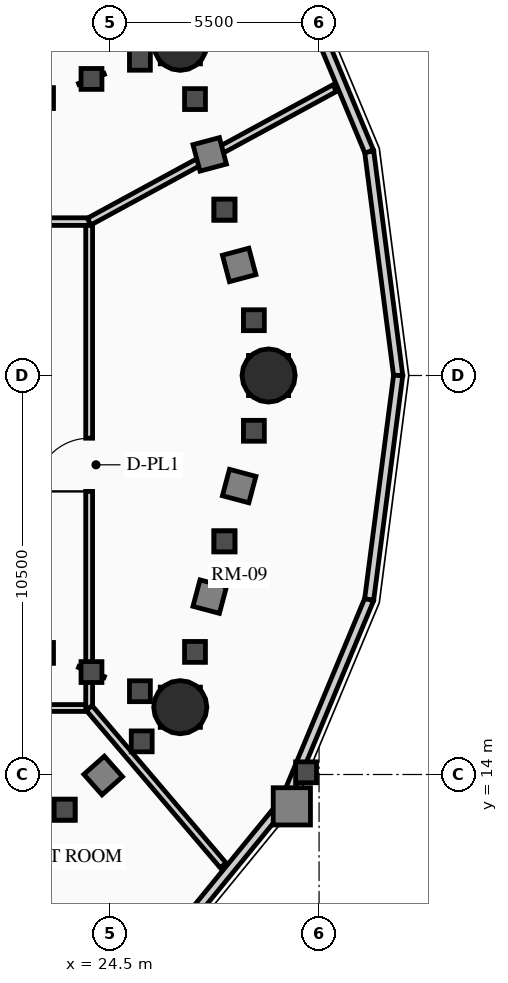
"""IFC4 building model, lengths in metres.
Left out: names, types, materials, properties, quantities, classifications, styles, units other than length and angle.
Written with IfcOpenShell. Run it as: python <this file> out.ifc"""

import sys

from ifc_helpers import new_model, si_unit, direction, frame, frame_2d, origin, origin_2d, place, context, subcontext, project, spatial, rectangle, circle, extrude, source, transform, mapped, element, fill, save


model = new_model("IFC4")
c1 = context("Model", 3, precision=1e-05, world=origin(), true_north=direction((0.0, 1.0)))
c2 = subcontext(c1, "Body", "Model", "MODEL_VIEW")
j1 = project(units=[si_unit("LENGTHUNIT", "METRE"), si_unit("PLANEANGLEUNIT", "RADIAN")], contexts=[c1])
p1 = place(None, origin())
s1 = spatial("IfcSite", under=j1, at=p1, CompositionType="ELEMENT")
p2 = place(p1, origin())
s2 = spatial("IfcBuilding", under=s1, at=p2, CompositionType="ELEMENT")
p3 = place(p2, frame((0.0, 0.0, 65.65)))
s3 = spatial("IfcBuildingStorey", under=s2, at=p3, CompositionType="ELEMENT", Elevation=65.65)
for number, where, z_axis, x_axis in (
    (1, (28.672, 24.5, 0.0), (0.0, 0.0, 1.0), (1.0, 0.0, 0.0)),
    (2, (26.347, 33.229, 0.0), (0.0, 0.0, 1.0), (1.0, 0.0, 0.0)),
    (3, (26.347, 15.771, 0.0), (0.0, 0.0, 1.0), (1.0, 0.0, 0.0)),
):
    element("IfcColumn", number, at=place(p3, frame(where, z_axis=z_axis, x_axis=x_axis)), inside=s3, PredefinedType="USERDEFINED", context=c2, shape_type="SweptSolid", body=[
        extrude(circle(Radius=0.7, at=origin_2d()), origin(), (0.0, 0.0, 1.0), 4.5),
    ])
p4 = place(p3, frame((31.318, 30.393, 0.0), z_axis=(0.0, 0.0, 1.0), x_axis=(0.128351991996, -0.991728675672, 0.0)))
e4 = element("IfcWall", 4, at=p4, inside=s3, PredefinedType="SOLIDWALL", context=c2, shape_type="SweptSolid", body=[
    extrude(rectangle(XDim=5.942, YDim=0.24, at=frame_2d((2.971, 0.0))), origin(), (0.0, 0.0, 1.0), 3.616),
])
p5 = place(p3, frame((29.105, 35.709, 0.0), z_axis=(0.0, 0.0, 1.0), x_axis=(0.384344417632, -0.923189779317, 0.0)))
e5 = element("IfcWall", 5, at=p5, inside=s3, PredefinedType="SOLIDWALL", context=c2, shape_type="SweptSolid", body=[
    extrude(rectangle(XDim=5.758, YDim=0.24, at=frame_2d((2.879, 0.0))), origin(), (0.0, 0.0, 1.0), 3.616),
])
p6 = place(p3, frame((29.105, 13.291, 0.0), z_axis=(0.0, 0.0, 1.0), x_axis=(-0.632700781152, -0.77439635945, 0.0)))
e6 = element("IfcWall", 6, at=p6, inside=s3, PredefinedType="SOLIDWALL", context=c2, shape_type="SweptSolid", body=[
    extrude(rectangle(XDim=5.448, YDim=0.24, at=frame_2d((2.724, 0.0))), origin(), (0.0, 0.0, 1.0), 3.616),
])
p7 = place(p3, frame((31.318, 18.607, 0.0), z_axis=(0.0, 0.0, 1.0), x_axis=(-0.384344417632, -0.923189779317, 0.0)))
e7 = element("IfcWall", 7, at=p7, inside=s3, PredefinedType="SOLIDWALL", context=c2, shape_type="SweptSolid", body=[
    extrude(rectangle(XDim=5.758, YDim=0.24, at=frame_2d((2.879, 0.0))), origin(), (0.0, 0.0, 1.0), 3.616),
])
p8 = place(p3, frame((32.081, 24.5, 0.0), z_axis=(0.0, 0.0, 1.0), x_axis=(-0.128351991996, -0.991728675672, 0.0)))
e8 = element("IfcWall", 8, at=p8, inside=s3, PredefinedType="SOLIDWALL", context=c2, shape_type="SweptSolid", body=[
    extrude(rectangle(XDim=5.942, YDim=0.24, at=frame_2d((2.971, 0.0))), origin(), (0.0, 0.0, 1.0), 3.616),
])
p9 = place(p3, frame((9.05, 15.75, 0.0), z_axis=(0.0, 0.0, 1.0), x_axis=(1.0, 0.0, 0.0)))
e9 = element("IfcWall", 9, at=p9, inside=s3, PredefinedType="PARTITIONING", context=c2, shape_type="SweptSolid", body=[
    extrude(rectangle(XDim=14.9, YDim=0.18, at=frame_2d((7.45, 0.0))), origin(), (0.0, 0.0, 1.0), 3.536),
])
m1 = source(origin(), c2, "Body", "SweptSolid", [
    extrude(rectangle(XDim=1.4, YDim=2.02, at=frame_2d((0.7, 1.01))), frame((0.0, 0.1, 0.0), z_axis=(0.0, -1.0, 0.0), x_axis=(1.0, 0.0, 0.0)), (0.0, 0.0, 1.0), 0.2),
])
p10 = place(p9, frame((6.75, 0.0, 0.0)))
e10 = element("IfcOpeningElement", 10, at=p10, cuts=e9, PredefinedType="OPENING", context=c2, shape_type="MappedRepresentation", body=[
    mapped(m1, transform((0.0, 0.0, 0.0), x_axis=(1.0, 0.0, 0.0), y_axis=(0.0, 1.0, 0.0), z_axis=(0.0, 0.0, 1.0), scale=1.0)),
])
p11 = place(p3, frame((23.95, 15.75, 0.0), z_axis=(0.0, 0.0, 1.0), x_axis=(0.0, 1.0, 0.0)))
e11 = element("IfcWall", 11, at=p11, inside=s3, PredefinedType="PARTITIONING", context=c2, shape_type="SweptSolid", body=[
    extrude(rectangle(XDim=12.8, YDim=0.18, at=frame_2d((6.4, 0.0))), origin(), (0.0, 0.0, 1.0), 3.536),
])
p12 = place(p11, frame((5.7, 0.0, 0.0)))
e12 = element("IfcOpeningElement", 12, at=p12, cuts=e11, PredefinedType="OPENING", context=c2, shape_type="MappedRepresentation", body=[
    mapped(m1, transform((0.0, 0.0, 0.0), x_axis=(1.0, 0.0, 0.0), y_axis=(0.0, 1.0, 0.0), z_axis=(0.0, 0.0, 1.0), scale=1.0)),
])
p13 = place(p3, frame((22.1, 28.55, 0.0), z_axis=(0.0, 0.0, 1.0), x_axis=(1.0, 0.0, 0.0)))
e13 = element("IfcWall", 13, at=p13, inside=s3, PredefinedType="PARTITIONING", context=c2, shape_type="SweptSolid", body=[
    extrude(rectangle(XDim=1.85, YDim=0.2, at=frame_2d((0.925, 0.0))), origin(), (0.0, 0.0, 1.0), 4.245),
])
p14 = place(p3, frame((23.95, 28.55, 0.0), z_axis=(0.0, 0.0, 1.0), x_axis=(0.878573622909, 0.477606939992, 0.0)))
e14 = element("IfcWall", 14, at=p14, inside=s3, PredefinedType="PARTITIONING", context=c2, shape_type="SweptSolid", body=[
    extrude(rectangle(XDim=7.352, YDim=0.2, at=frame_2d((3.676, 0.0))), origin(), (0.0, 0.0, 1.0), 3.536),
])
p15 = place(p3, frame((23.95, 15.75, 0.0), z_axis=(0.0, 0.0, 1.0), x_axis=(0.648289189653, -0.761394199202, 0.0)))
e15 = element("IfcWall", 15, at=p15, inside=s3, PredefinedType="PARTITIONING", context=c2, shape_type="SweptSolid", body=[
    extrude(rectangle(XDim=5.439, YDim=0.2, at=frame_2d((2.72, 0.0))), origin(), (0.0, 0.0, 1.0), 3.616),
])
m2 = source(origin(), c2, "Body", "SweptSolid", [
    extrude(rectangle(XDim=1.4, YDim=2.02, at=frame_2d((0.7, 1.01))), frame((0.0, 0.025, 0.0), z_axis=(0.0, -1.0, 0.0), x_axis=(1.0, 0.0, 0.0)), (0.0, 0.0, 1.0), 0.05),
])
p16 = place(p12, origin())
e16 = element("IfcDoor", 16, at=p16, inside=s3, OperationType="SINGLE_SWING_LEFT", PredefinedType="DOOR", context=c2, shape_type="MappedRepresentation", body=[
    mapped(m2, transform((0.0, 0.0, 0.0), x_axis=(1.0, 0.0, 0.0), y_axis=(0.0, 1.0, 0.0), z_axis=(0.0, 0.0, 1.0), scale=1.0)),
])
fill(e12, e16)
save(model, sys.argv[1])
